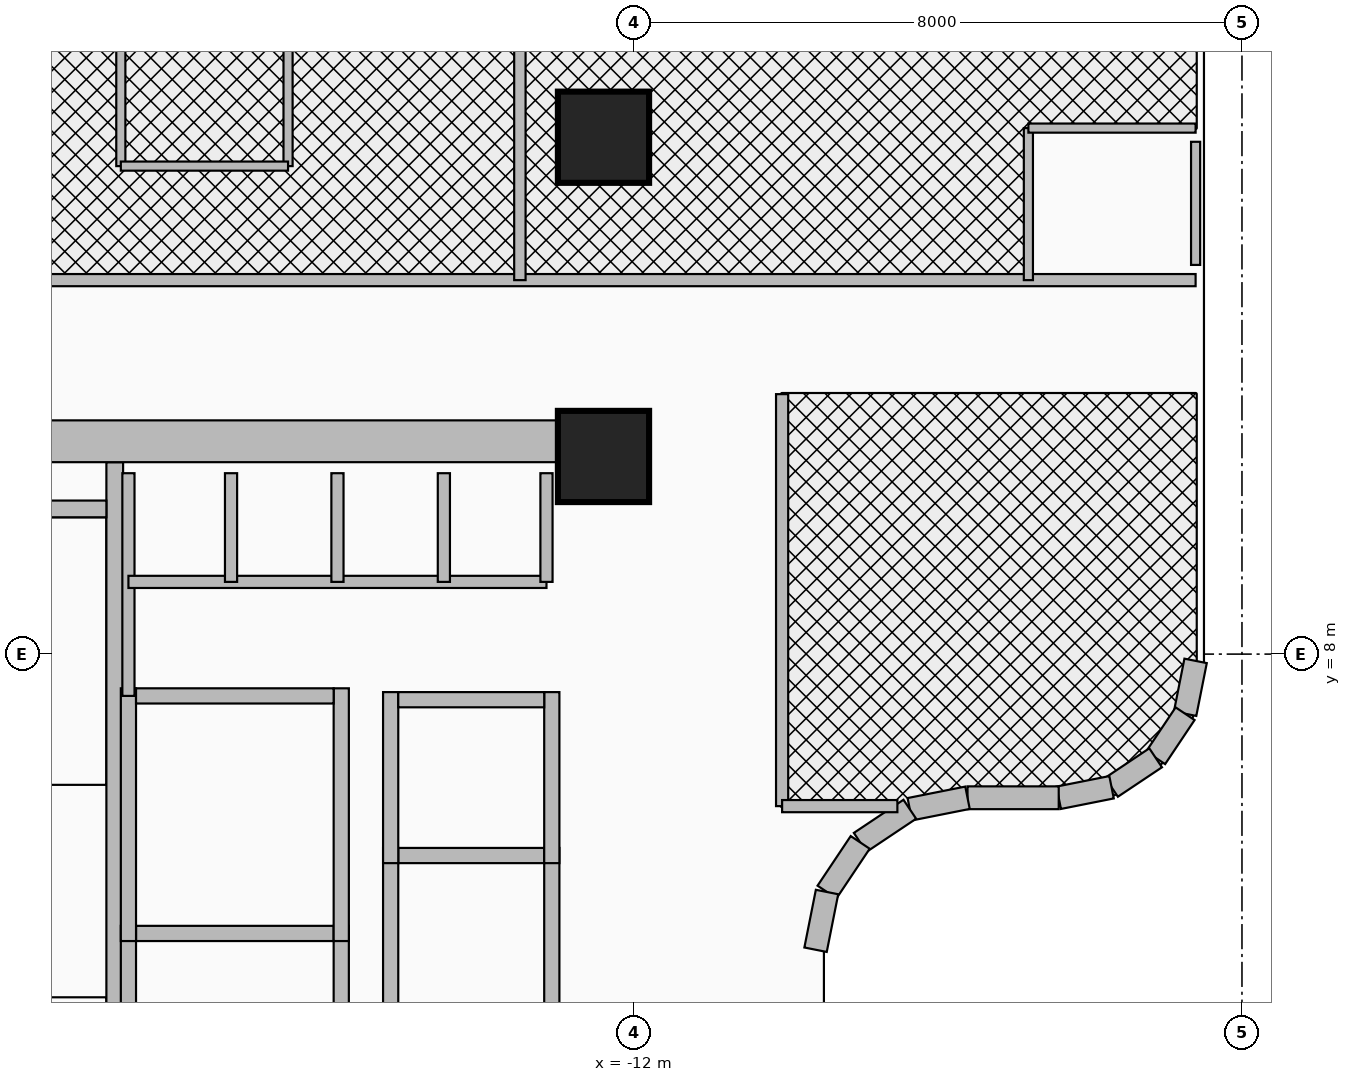
"""IFC4 building model, lengths in metres.
Left out: names, types, materials, properties, quantities, classifications, styles, units other than length and angle.
Written with IfcOpenShell. Run it as: python <this file> out.ifc"""

import sys

from ifc_helpers import new_model, si_unit, direction, frame, frame_2d, origin, origin_2d, place, context, subcontext, project, spatial, rectangle, extrude, source, transform, mapped, element, fill, save


model = new_model("IFC4")
c1 = context("Model", 3, precision=1e-05, world=origin(), true_north=direction((0.0, 1.0)))
c2 = subcontext(c1, "Body", "Model", "MODEL_VIEW")
j1 = project(units=[si_unit("LENGTHUNIT", "METRE"), si_unit("PLANEANGLEUNIT", "RADIAN")], contexts=[c1])
p1 = place(None, origin())
s1 = spatial("IfcSite", under=j1, at=p1, CompositionType="ELEMENT")
p2 = place(p1, origin())
s2 = spatial("IfcBuilding", under=s1, at=p2, CompositionType="ELEMENT")
p3 = place(p2, frame((0.0, 0.0, 153.8)))
s3 = spatial("IfcBuildingStorey", under=s2, at=p3, CompositionType="ELEMENT", Elevation=153.8)
p4 = place(p3, frame((-18.83, 1.78, 0.0), z_axis=(0.0, 0.0, 1.0), x_axis=(0.0, 1.0, 0.0)))
e1 = element("IfcWall", 1, at=p4, inside=s3, PredefinedType="SHEAR", context=c2, shape_type="SweptSolid", body=[
    extrude(rectangle(XDim=8.745, YDim=0.22, at=frame_2d((4.373, 0.0))), origin(), (0.0, 0.0, 1.0), 3.46),
])
p5 = place(p3, frame((-22.05, 9.91, 0.0), z_axis=(0.0, 0.0, 1.0), x_axis=(1.0, 0.0, 0.0)))
e2 = element("IfcWall", 2, at=p5, inside=s3, PredefinedType="SHEAR", context=c2, shape_type="SweptSolid", body=[
    extrude(rectangle(XDim=3.11, YDim=0.22, at=frame_2d((1.555, 0.0))), origin(), (0.0, 0.0, 1.0), 3.46),
])
p6 = place(p3, frame((-22.65, 10.8, 0.0), z_axis=(0.0, 0.0, 1.0), x_axis=(1.0, 0.0, 0.0)))
e3 = element("IfcWall", 3, at=p6, inside=s3, PredefinedType="SHEAR", context=c2, shape_type="SweptSolid", body=[
    extrude(rectangle(XDim=10.25, YDim=0.55, at=frame_2d((5.125, 0.0))), origin(), (0.0, 0.0, 1.0), 3.46),
])
m1 = source(origin(), c2, "Body", "SweptSolid", [
    extrude(rectangle(XDim=1.2, YDim=1.2, at=origin_2d()), origin(), (0.0, 0.0, 1.0), 3.7),
])
for number, where, z_axis, x_axis in (
    (4, (-12.4, 10.6, 0.0), (0.0, 0.0, 1.0), (1.0, 0.0, 0.0)),
    (5, (-12.4, 14.8, 0.0), (0.0, 0.0, 1.0), (1.0, 0.0, 0.0)),
):
    element("IfcColumn", number, at=place(p3, frame(where, z_axis=z_axis, x_axis=x_axis)), inside=s3, PredefinedType="COLUMN", context=c2, shape_type="MappedRepresentation", body=[
        mapped(m1, transform((0.0, 0.0, 0.0), x_axis=(1.0, 0.0, 0.0), y_axis=(0.0, 1.0, 0.0), z_axis=(0.0, 0.0, 1.0), scale=1.0)),
    ])
p7 = place(p3, frame((-4.61, 7.911, 0.0), z_axis=(0.0, 0.0, 1.0), x_axis=(-0.194989739953, -0.980805282058, 0.0)))
e6 = element("IfcWall", 6, at=p7, inside=s3, PredefinedType="SOLIDWALL", context=c2, shape_type="SweptSolid", body=[
    extrude(rectangle(XDim=0.709, YDim=0.3, at=frame_2d((0.354, 0.0))), origin(), (0.0, 0.0, 1.0), 3.46),
])
for number, where, z_axis, x_axis in (
    (7, (-4.748, 7.216, 0.0), (0.0, 0.0, 1.0), (-0.555, -0.832, 0.0)),
    (8, (-5.136, 6.636, 0.0), (0.0, 0.0, 1.0), (-0.832, -0.555, 0.0)),
):
    element("IfcWall", number, at=place(p3, frame(where, z_axis=z_axis, x_axis=x_axis)), inside=s3, PredefinedType="SOLIDWALL", context=c2, shape_type="SweptSolid", body=[
        extrude(rectangle(XDim=0.698, YDim=0.3, at=frame_2d((0.349, 0.0))), origin(), (0.0, 0.0, 1.0), 3.46),
    ])
p8 = place(p3, frame((-5.716, 6.248, 0.0), z_axis=(0.0, 0.0, 1.0), x_axis=(-0.980805282058, -0.194989739953, 0.0)))
e9 = element("IfcWall", 9, at=p8, inside=s3, PredefinedType="SOLIDWALL", context=c2, shape_type="SweptSolid", body=[
    extrude(rectangle(XDim=0.709, YDim=0.3, at=frame_2d((0.354, 0.0))), origin(), (0.0, 0.0, 1.0), 3.46),
])
p9 = place(p3, frame((-6.411, 6.11, 0.0), z_axis=(0.0, 0.0, 1.0), x_axis=(-1.0, 0.0, 0.0)))
e10 = element("IfcWall", 10, at=p9, inside=s3, PredefinedType="SOLIDWALL", context=c2, shape_type="SweptSolid", body=[
    extrude(rectangle(XDim=1.2, YDim=0.3, at=frame_2d((0.6, 0.0))), origin(), (0.0, 0.0, 1.0), 3.46),
])
p10 = place(p3, frame((-7.611, 6.11, 0.0), z_axis=(0.0, 0.0, 1.0), x_axis=(-0.98076219082, -0.195206365311, 0.0)))
e11 = element("IfcWall", 11, at=p10, inside=s3, PredefinedType="SOLIDWALL", context=c2, shape_type="SweptSolid", body=[
    extrude(rectangle(XDim=0.774, YDim=0.3, at=frame_2d((0.387, 0.0))), origin(), (0.0, 0.0, 1.0), 3.46),
])
for number, where, z_axis, x_axis in (
    (12, (-8.37, 5.959, 0.0), (0.0, 0.0, 1.0), (-0.831, -0.556, 0.0)),
    (13, (-9.023, 5.523, 0.0), (0.0, 0.0, 1.0), (-0.556, -0.831, 0.0)),
):
    element("IfcWall", number, at=place(p3, frame(where, z_axis=z_axis, x_axis=x_axis)), inside=s3, PredefinedType="SOLIDWALL", context=c2, shape_type="SweptSolid", body=[
        extrude(rectangle(XDim=0.785, YDim=0.3, at=frame_2d((0.393, 0.0))), origin(), (0.0, 0.0, 1.0), 3.46),
    ])
p11 = place(p3, frame((-9.459, 4.87, 0.0), z_axis=(0.0, 0.0, 1.0), x_axis=(-0.195206365311, -0.98076219082, 0.0)))
e14 = element("IfcWall", 14, at=p11, inside=s3, PredefinedType="SOLIDWALL", context=c2, shape_type="SweptSolid", body=[
    extrude(rectangle(XDim=0.774, YDim=0.3, at=frame_2d((0.387, 0.0))), origin(), (0.0, 0.0, 1.0), 3.46),
])
for number, where, z_axis, x_axis in (
    (15, (-18.65, 1.2, 0.0), (0.0, 0.0, 1.0), (0.0, 1.0, 0.0)),
    (16, (-15.85, 1.2, 0.0), (0.0, 0.0, 1.0), (0.0, 1.0, 0.0)),
):
    element("IfcWall", number, at=place(p3, frame(where, z_axis=z_axis, x_axis=x_axis)), inside=s3, PredefinedType="MOVABLE", context=c2, shape_type="SweptSolid", body=[
        extrude(rectangle(XDim=3.225, YDim=0.2, at=frame_2d((1.613, 0.0))), origin(), (0.0, 0.0, 1.0), 3.46),
    ])
p12 = place(p3, frame((-18.55, 4.325, 0.0), z_axis=(0.0, 0.0, 1.0), x_axis=(1.0, 0.0, 0.0)))
e17 = element("IfcWall", 17, at=p12, inside=s3, PredefinedType="MOVABLE", context=c2, shape_type="SweptSolid", body=[
    extrude(rectangle(XDim=2.6, YDim=0.2, at=frame_2d((1.3, 0.0))), origin(), (0.0, 0.0, 1.0), 3.46),
])
for number, where, z_axis, x_axis in (
    (18, (-18.65, 4.225, 0.0), (0.0, 0.0, 1.0), (0.0, 1.0, 0.0)),
    (19, (-15.85, 4.225, 0.0), (0.0, 0.0, 1.0), (0.0, 1.0, 0.0)),
):
    element("IfcWall", number, at=place(p3, frame(where, z_axis=z_axis, x_axis=x_axis)), inside=s3, PredefinedType="MOVABLE", context=c2, shape_type="SweptSolid", body=[
        extrude(rectangle(XDim=3.325, YDim=0.2, at=frame_2d((1.663, 0.0))), origin(), (0.0, 0.0, 1.0), 3.46),
    ])
p13 = place(p3, frame((-18.55, 7.45, 0.0), z_axis=(0.0, 0.0, 1.0), x_axis=(1.0, 0.0, 0.0)))
e20 = element("IfcWall", 20, at=p13, inside=s3, PredefinedType="MOVABLE", context=c2, shape_type="SweptSolid", body=[
    extrude(rectangle(XDim=2.6, YDim=0.2, at=frame_2d((1.3, 0.0))), origin(), (0.0, 0.0, 1.0), 3.46),
])
p14 = place(p13, frame((0.7, 0.0, 0.0)))
e21 = element("IfcOpeningElement", 21, at=p14, cuts=e20, PredefinedType="OPENING", context=c2, shape_type="SweptSolid", body=[
    extrude(rectangle(XDim=1.2, YDim=2.1, at=frame_2d((0.6, 1.05))), frame((0.0, 0.115, 0.0), z_axis=(0.0, -1.0, 0.0), x_axis=(1.0, 0.0, 0.0)), (0.0, 0.0, 1.0), 0.23),
])
for number, where, z_axis, x_axis in (
    (22, (-15.2, 3.2, 0.0), (0.0, 0.0, 1.0), (0.0, 1.0, 0.0)),
    (23, (-13.08, 3.2, 0.0), (0.0, 0.0, 1.0), (0.0, 1.0, 0.0)),
):
    element("IfcWall", number, at=place(p3, frame(where, z_axis=z_axis, x_axis=x_axis)), inside=s3, PredefinedType="MOVABLE", context=c2, shape_type="SweptSolid", body=[
        extrude(rectangle(XDim=2.25, YDim=0.2, at=frame_2d((1.125, 0.0))), origin(), (0.0, 0.0, 1.0), 3.46),
    ])
p15 = place(p3, frame((-15.1, 5.35, 0.0), z_axis=(0.0, 0.0, 1.0), x_axis=(1.0, 0.0, 0.0)))
e24 = element("IfcWall", 24, at=p15, inside=s3, PredefinedType="MOVABLE", context=c2, shape_type="SweptSolid", body=[
    extrude(rectangle(XDim=1.92, YDim=0.2, at=frame_2d((0.96, 0.0))), origin(), (0.0, 0.0, 1.0), 3.46),
])
for number, where, z_axis, x_axis in (
    (25, (-15.2, 5.25, 0.0), (0.0, 0.0, 1.0), (0.0, 1.0, 0.0)),
    (26, (-13.08, 5.25, 0.0), (0.0, 0.0, 1.0), (0.0, 1.0, 0.0)),
):
    element("IfcWall", number, at=place(p3, frame(where, z_axis=z_axis, x_axis=x_axis)), inside=s3, PredefinedType="MOVABLE", context=c2, shape_type="SweptSolid", body=[
        extrude(rectangle(XDim=2.25, YDim=0.2, at=frame_2d((1.125, 0.0))), origin(), (0.0, 0.0, 1.0), 3.46),
    ])
p16 = place(p3, frame((-15.1, 7.4, 0.0), z_axis=(0.0, 0.0, 1.0), x_axis=(1.0, 0.0, 0.0)))
e27 = element("IfcWall", 27, at=p16, inside=s3, PredefinedType="MOVABLE", context=c2, shape_type="SweptSolid", body=[
    extrude(rectangle(XDim=1.92, YDim=0.2, at=frame_2d((0.96, 0.0))), origin(), (0.0, 0.0, 1.0), 3.46),
])
p17 = place(p3, frame((-18.65, 7.45, 0.0), z_axis=(0.0, 0.0, 1.0), x_axis=(0.0, 1.0, 0.0)))
e28 = element("IfcWall", 28, at=p17, inside=s3, PredefinedType="PARTITIONING", context=c2, shape_type="SweptSolid", body=[
    extrude(rectangle(XDim=2.93, YDim=0.16, at=frame_2d((1.465, 0.0))), origin(), (0.0, 0.0, 1.0), 3.46),
])
p18 = place(p3, frame((-18.65, 8.95, 0.0), z_axis=(0.0, 0.0, 1.0), x_axis=(1.0, 0.0, 0.0)))
e29 = element("IfcWall", 29, at=p18, inside=s3, PredefinedType="PARTITIONING", context=c2, shape_type="SweptSolid", body=[
    extrude(rectangle(XDim=5.5, YDim=0.16, at=frame_2d((2.75, 0.0))), origin(), (0.0, 0.0, 1.0), 3.46),
])
p19 = place(p18, frame((0.3, 0.0, 0.0)))
e30 = element("IfcOpeningElement", 30, at=p19, cuts=e29, PredefinedType="OPENING", context=c2, shape_type="SweptSolid", body=[
    extrude(rectangle(XDim=0.85, YDim=2.05, at=frame_2d((0.425, 1.025))), frame((0.0, 0.095, 0.0), z_axis=(0.0, -1.0, 0.0), x_axis=(1.0, 0.0, 0.0)), (0.0, 0.0, 1.0), 0.19),
])
p20 = place(p18, frame((1.55, 0.0, 0.0)))
e31 = element("IfcOpeningElement", 31, at=p20, cuts=e29, PredefinedType="OPENING", context=c2, shape_type="SweptSolid", body=[
    extrude(rectangle(XDim=0.85, YDim=2.05, at=frame_2d((0.425, 1.025))), frame((0.0, 0.095, 0.0), z_axis=(0.0, -1.0, 0.0), x_axis=(1.0, 0.0, 0.0)), (0.0, 0.0, 1.0), 0.19),
])
p21 = place(p18, frame((2.95, 0.0, 0.0)))
e32 = element("IfcOpeningElement", 32, at=p21, cuts=e29, PredefinedType="OPENING", context=c2, shape_type="SweptSolid", body=[
    extrude(rectangle(XDim=0.85, YDim=2.05, at=frame_2d((0.425, 1.025))), frame((0.0, 0.095, 0.0), z_axis=(0.0, -1.0, 0.0), x_axis=(1.0, 0.0, 0.0)), (0.0, 0.0, 1.0), 0.19),
])
p22 = place(p18, frame((4.35, 0.0, 0.0)))
e33 = element("IfcOpeningElement", 33, at=p22, cuts=e29, PredefinedType="OPENING", context=c2, shape_type="SweptSolid", body=[
    extrude(rectangle(XDim=0.85, YDim=2.05, at=frame_2d((0.425, 1.025))), frame((0.0, 0.095, 0.0), z_axis=(0.0, -1.0, 0.0), x_axis=(1.0, 0.0, 0.0)), (0.0, 0.0, 1.0), 0.19),
])
for number, where, z_axis, x_axis in (
    (34, (-13.15, 8.95, 0.0), (0.0, 0.0, 1.0), (0.0, 1.0, 0.0)),
    (35, (-17.3, 8.95, 0.0), (0.0, 0.0, 1.0), (0.0, 1.0, 0.0)),
    (36, (-15.9, 8.95, 0.0), (0.0, 0.0, 1.0), (0.0, 1.0, 0.0)),
    (37, (-14.5, 8.95, 0.0), (0.0, 0.0, 1.0), (0.0, 1.0, 0.0)),
):
    element("IfcWall", number, at=place(p3, frame(where, z_axis=z_axis, x_axis=x_axis)), inside=s3, PredefinedType="PARTITIONING", context=c2, shape_type="SweptSolid", body=[
        extrude(rectangle(XDim=1.43, YDim=0.16, at=frame_2d((0.715, 0.0))), origin(), (0.0, 0.0, 1.0), 3.46),
    ])
p23 = place(p3, frame((-28.25, 12.92, 0.0), z_axis=(0.0, 0.0, 1.0), x_axis=(1.0, 0.0, 0.0)))
e38 = element("IfcWall", 38, at=p23, inside=s3, PredefinedType="PARTITIONING", context=c2, shape_type="SweptSolid", body=[
    extrude(rectangle(XDim=23.64, YDim=0.16, at=frame_2d((11.82, 0.0))), origin(), (0.0, 0.0, 1.0), 2.834),
])
p24 = place(p23, frame((2.75, 0.0, 0.0)))
e39 = element("IfcOpeningElement", 39, at=p24, cuts=e38, PredefinedType="OPENING", context=c2, shape_type="SweptSolid", body=[
    extrude(rectangle(XDim=0.95, YDim=2.15, at=frame_2d((0.475, 1.075))), frame((0.0, 0.095, 0.0), z_axis=(0.0, -1.0, 0.0), x_axis=(1.0, 0.0, 0.0)), (0.0, 0.0, 1.0), 0.19),
])
p25 = place(p23, frame((10.125, 0.0, 0.0)))
e40 = element("IfcOpeningElement", 40, at=p25, cuts=e38, PredefinedType="OPENING", context=c2, shape_type="SweptSolid", body=[
    extrude(rectangle(XDim=0.95, YDim=2.15, at=frame_2d((0.475, 1.075))), frame((0.0, 0.095, 0.0), z_axis=(0.0, -1.0, 0.0), x_axis=(1.0, 0.0, 0.0)), (0.0, 0.0, 1.0), 0.19),
])
p26 = place(p23, frame((17.62, 0.0, 0.0)))
e41 = element("IfcOpeningElement", 41, at=p26, cuts=e38, PredefinedType="OPENING", context=c2, shape_type="SweptSolid", body=[
    extrude(rectangle(XDim=0.95, YDim=2.15, at=frame_2d((0.475, 1.075))), frame((0.0, 0.095, 0.0), z_axis=(0.0, -1.0, 0.0), x_axis=(1.0, 0.0, 0.0)), (0.0, 0.0, 1.0), 0.19),
])
p27 = place(p3, frame((-13.5, 12.92, 0.0), z_axis=(0.0, 0.0, 1.0), x_axis=(0.0, 1.0, 0.0)))
e42 = element("IfcWall", 42, at=p27, inside=s3, PredefinedType="PARTITIONING", context=c2, shape_type="SweptSolid", body=[
    extrude(rectangle(XDim=6.694, YDim=0.15, at=frame_2d((3.347, 0.0))), origin(), (0.0, 0.0, 1.0), 2.666),
])
for number, where, z_axis, x_axis in (
    (43, (-18.75, 14.42, 0.0), (0.0, 0.0, 1.0), (0.0, 1.0, 0.0)),
    (44, (-16.55, 14.42, 0.0), (0.0, 0.0, 1.0), (0.0, 1.0, 0.0)),
):
    element("IfcWall", number, at=place(p3, frame(where, z_axis=z_axis, x_axis=x_axis)), inside=s3, PredefinedType="PARTITIONING", context=c2, shape_type="SweptSolid", body=[
        extrude(rectangle(XDim=2.0, YDim=0.12, at=frame_2d((1.0, 0.0))), origin(), (0.0, 0.0, 1.0), 2.666),
    ])
p28 = place(p3, frame((-18.75, 14.42, 0.0), z_axis=(0.0, 0.0, 1.0), x_axis=(1.0, 0.0, 0.0)))
e45 = element("IfcWall", 45, at=p28, inside=s3, PredefinedType="PARTITIONING", context=c2, shape_type="SweptSolid", body=[
    extrude(rectangle(XDim=2.2, YDim=0.12, at=frame_2d((1.1, 0.0))), origin(), (0.0, 0.0, 1.0), 3.46),
])
p29 = place(p28, frame((0.675, 0.0, 0.0)))
e46 = element("IfcOpeningElement", 46, at=p29, cuts=e45, PredefinedType="OPENING", context=c2, shape_type="SweptSolid", body=[
    extrude(rectangle(XDim=0.85, YDim=2.1, at=frame_2d((0.425, 1.05))), frame((0.0, 0.075, 0.0), z_axis=(0.0, -1.0, 0.0), x_axis=(1.0, 0.0, 0.0)), (0.0, 0.0, 1.0), 0.15),
])
p30 = place(p3, frame((-6.81, 12.92, 0.0), z_axis=(0.0, 0.0, 1.0), x_axis=(0.0, 1.0, 0.0)))
e47 = element("IfcWall", 47, at=p30, inside=s3, PredefinedType="PARTITIONING", context=c2, shape_type="SweptSolid", body=[
    extrude(rectangle(XDim=2.0, YDim=0.12, at=frame_2d((1.0, 0.0))), origin(), (0.0, 0.0, 1.0), 3.46),
])
p31 = place(p3, frame((-6.81, 14.92, 0.0), z_axis=(0.0, 0.0, 1.0), x_axis=(1.0, 0.0, 0.0)))
e48 = element("IfcWall", 48, at=p31, inside=s3, PredefinedType="PARTITIONING", context=c2, shape_type="SweptSolid", body=[
    extrude(rectangle(XDim=2.2, YDim=0.12, at=frame_2d((1.1, 0.0))), origin(), (0.0, 0.0, 1.0), 3.46),
])
p32 = place(p31, frame((0.675, 0.0, 0.0)))
e49 = element("IfcOpeningElement", 49, at=p32, cuts=e48, PredefinedType="OPENING", context=c2, shape_type="SweptSolid", body=[
    extrude(rectangle(XDim=0.85, YDim=2.1, at=frame_2d((0.425, 1.05))), frame((0.0, 0.075, 0.0), z_axis=(0.0, -1.0, 0.0), x_axis=(1.0, 0.0, 0.0)), (0.0, 0.0, 1.0), 0.15),
])
p33 = place(p3, frame((-4.61, 13.12, 0.0), z_axis=(0.0, 0.0, 1.0), x_axis=(0.0, 1.0, 0.0)))
e50 = element("IfcWall", 50, at=p33, inside=s3, PredefinedType="PARTITIONING", context=c2, shape_type="SweptSolid", body=[
    extrude(rectangle(XDim=1.62, YDim=0.12, at=frame_2d((0.81, 0.0))), origin(), (0.0, 0.0, 1.0), 3.46),
])
p34 = place(p3, frame((-10.05, 6.0, 0.0), z_axis=(0.0, 0.0, 1.0), x_axis=(0.0, 1.0, 0.0)))
e51 = element("IfcWall", 51, at=p34, inside=s3, PredefinedType="PARTITIONING", context=c2, shape_type="SweptSolid", body=[
    extrude(rectangle(XDim=5.42, YDim=0.16, at=frame_2d((2.71, 0.0))), origin(), (0.0, 0.0, 1.0), 3.46),
])
p35 = place(p34, frame((2.26, 0.0, 0.0)))
e52 = element("IfcOpeningElement", 52, at=p35, cuts=e51, PredefinedType="OPENING", context=c2, shape_type="SweptSolid", body=[
    extrude(rectangle(XDim=0.9, YDim=2.1, at=frame_2d((0.45, 1.05))), frame((0.0, 0.095, 0.0), z_axis=(0.0, -1.0, 0.0), x_axis=(1.0, 0.0, 0.0)), (0.0, 0.0, 1.0), 0.19),
])
p36 = place(p3, frame((-10.05, 6.0, 0.0), z_axis=(0.0, 0.0, 1.0), x_axis=(1.0, 0.0, 0.0)))
e53 = element("IfcWall", 53, at=p36, inside=s3, PredefinedType="PARTITIONING", context=c2, shape_type="SweptSolid", body=[
    extrude(rectangle(XDim=1.516, YDim=0.16, at=frame_2d((0.758, 0.0))), origin(), (0.0, 0.0, 1.0), 3.46),
])
p37 = place(p14, origin())
e54 = element("IfcDoor", 54, at=p37, inside=s3, OperationType="DOUBLE_DOOR_SLIDING", PredefinedType="DOOR", context=c2, shape_type="SweptSolid", body=[
    extrude(rectangle(XDim=1.2, YDim=2.1, at=frame_2d((0.6, 1.05))), frame((0.0, 0.025, 0.0), z_axis=(0.0, -1.0, 0.0), x_axis=(1.0, 0.0, 0.0)), (0.0, 0.0, 1.0), 0.05),
])
fill(e21, e54)
p38 = place(p19, origin())
e55 = element("IfcDoor", 55, at=p38, inside=s3, OperationType="SINGLE_SWING_LEFT", PredefinedType="DOOR", context=c2, shape_type="SweptSolid", body=[
    extrude(rectangle(XDim=0.85, YDim=2.05, at=frame_2d((0.425, 1.025))), frame((0.0, 0.025, 0.0), z_axis=(0.0, -1.0, 0.0), x_axis=(1.0, 0.0, 0.0)), (0.0, 0.0, 1.0), 0.05),
])
fill(e30, e55)
p39 = place(p20, origin())
e56 = element("IfcDoor", 56, at=p39, inside=s3, OperationType="SINGLE_SWING_RIGHT", PredefinedType="DOOR", context=c2, shape_type="SweptSolid", body=[
    extrude(rectangle(XDim=0.85, YDim=2.05, at=frame_2d((0.425, 1.025))), frame((0.0, 0.025, 0.0), z_axis=(0.0, -1.0, 0.0), x_axis=(1.0, 0.0, 0.0)), (0.0, 0.0, 1.0), 0.05),
])
fill(e31, e56)
p40 = place(p21, origin())
e57 = element("IfcDoor", 57, at=p40, inside=s3, OperationType="SINGLE_SWING_LEFT", PredefinedType="DOOR", context=c2, shape_type="SweptSolid", body=[
    extrude(rectangle(XDim=0.85, YDim=2.05, at=frame_2d((0.425, 1.025))), frame((0.0, 0.025, 0.0), z_axis=(0.0, -1.0, 0.0), x_axis=(1.0, 0.0, 0.0)), (0.0, 0.0, 1.0), 0.05),
])
fill(e32, e57)
p41 = place(p22, origin())
e58 = element("IfcDoor", 58, at=p41, inside=s3, OperationType="SINGLE_SWING_RIGHT", PredefinedType="DOOR", context=c2, shape_type="SweptSolid", body=[
    extrude(rectangle(XDim=0.85, YDim=2.05, at=frame_2d((0.425, 1.025))), frame((0.0, 0.025, 0.0), z_axis=(0.0, -1.0, 0.0), x_axis=(1.0, 0.0, 0.0)), (0.0, 0.0, 1.0), 0.05),
])
fill(e33, e58)
p42 = place(p25, frame((0.95, 0.0, 0.0), z_axis=(0.0, 0.0, 1.0), x_axis=(-1.0, 0.0, 0.0)))
e59 = element("IfcDoor", 59, at=p42, inside=s3, OperationType="SINGLE_SWING_LEFT", PredefinedType="DOOR", context=c2, shape_type="SweptSolid", body=[
    extrude(rectangle(XDim=0.95, YDim=2.15, at=frame_2d((0.475, 1.075))), frame((0.0, 0.025, 0.0), z_axis=(0.0, -1.0, 0.0), x_axis=(1.0, 0.0, 0.0)), (0.0, 0.0, 1.0), 0.05),
])
fill(e40, e59)
p43 = place(p29, origin())
e60 = element("IfcDoor", 60, at=p43, inside=s3, OperationType="SINGLE_SWING_RIGHT", PredefinedType="DOOR", context=c2, shape_type="SweptSolid", body=[
    extrude(rectangle(XDim=0.85, YDim=2.1, at=frame_2d((0.425, 1.05))), frame((0.0, 0.025, 0.0), z_axis=(0.0, -1.0, 0.0), x_axis=(1.0, 0.0, 0.0)), (0.0, 0.0, 1.0), 0.05),
])
fill(e46, e60)
p44 = place(p26, frame((0.95, 0.0, 0.0), z_axis=(0.0, 0.0, 1.0), x_axis=(-1.0, 0.0, 0.0)))
e61 = element("IfcDoor", 61, at=p44, inside=s3, OperationType="SINGLE_SWING_LEFT", PredefinedType="DOOR", context=c2, shape_type="SweptSolid", body=[
    extrude(rectangle(XDim=0.95, YDim=2.15, at=frame_2d((0.475, 1.075))), frame((0.0, 0.025, 0.0), z_axis=(0.0, -1.0, 0.0), x_axis=(1.0, 0.0, 0.0)), (0.0, 0.0, 1.0), 0.05),
])
fill(e41, e61)
p45 = place(p32, origin())
e62 = element("IfcDoor", 62, at=p45, inside=s3, OperationType="SINGLE_SWING_RIGHT", PredefinedType="DOOR", context=c2, shape_type="SweptSolid", body=[
    extrude(rectangle(XDim=0.85, YDim=2.1, at=frame_2d((0.425, 1.05))), frame((0.0, 0.025, 0.0), z_axis=(0.0, -1.0, 0.0), x_axis=(1.0, 0.0, 0.0)), (0.0, 0.0, 1.0), 0.05),
])
fill(e49, e62)
p46 = place(p35, frame((0.9, 0.0, 0.0), z_axis=(0.0, 0.0, 1.0), x_axis=(-1.0, 0.0, 0.0)))
e63 = element("IfcDoor", 63, at=p46, inside=s3, OperationType="SINGLE_SWING_LEFT", PredefinedType="DOOR", context=c2, shape_type="SweptSolid", body=[
    extrude(rectangle(XDim=0.9, YDim=2.1, at=frame_2d((0.45, 1.05))), frame((0.0, 0.025, 0.0), z_axis=(0.0, -1.0, 0.0), x_axis=(1.0, 0.0, 0.0)), (0.0, 0.0, 1.0), 0.05),
])
fill(e52, e63)
save(model, sys.argv[1])
